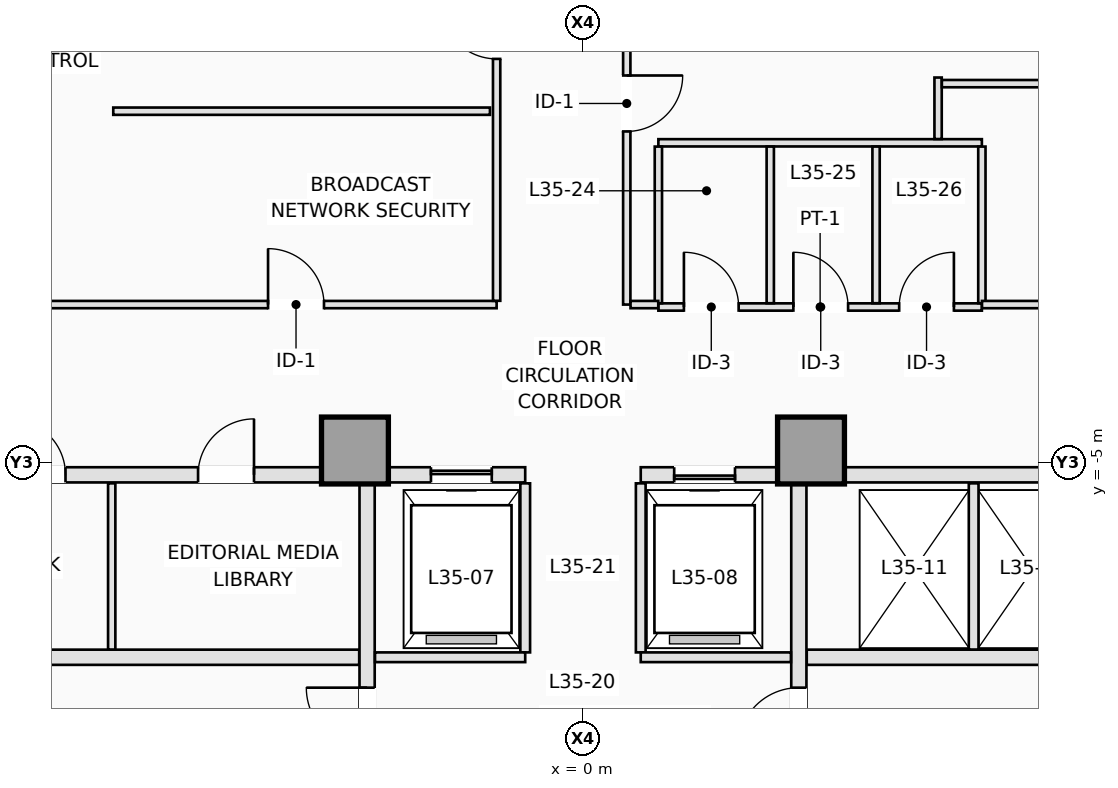
"""IFC4 building model, lengths in metres.
Left out: names, types, materials, properties, quantities, classifications, styles, units other than length and angle.
Written with IfcOpenShell. Run it as: python <this file> out.ifc"""

import sys

from ifc_helpers import new_model, si_unit, direction, frame, frame_2d, origin, origin_2d, place, context, subcontext, project, spatial, rectangle, extrude, element, fill, save


model = new_model("IFC4")
c1 = context("Model", 3, precision=1e-05, world=origin(), true_north=direction((0.0, 1.0)))
c2 = subcontext(c1, "Body", "Model", "MODEL_VIEW")
j1 = project(units=[si_unit("LENGTHUNIT", "METRE"), si_unit("PLANEANGLEUNIT", "RADIAN")], contexts=[c1])
p1 = place(None, origin())
s1 = spatial("IfcSite", under=j1, at=p1, CompositionType="ELEMENT")
p2 = place(p1, origin())
s2 = spatial("IfcBuilding", under=s1, at=p2, CompositionType="ELEMENT")
p3 = place(p2, frame((0.0, 0.0, 130.0)))
s3 = spatial("IfcBuildingStorey", under=s2, at=p3, CompositionType="ELEMENT", Elevation=130.0)
for number, where, z_axis, x_axis in (
    (1, (-3.75, -4.8, 0.0), (0.0, 0.0, 1.0), (1.0, 0.0, 0.0)),
    (2, (3.75, -4.8, 0.0), (0.0, 0.0, 1.0), (1.0, 0.0, 0.0)),
):
    element("IfcColumn", number, at=place(p3, frame(where, z_axis=z_axis, x_axis=x_axis)), inside=s3, PredefinedType="COLUMN", context=c2, shape_type="SweptSolid", body=[
        extrude(rectangle(XDim=1.1, YDim=1.1, at=origin_2d()), origin(), (0.0, 0.0, 1.0), 3.5),
    ])
for number, where, z_axis, x_axis in (
    (3, (-8.92, -8.2, 0.0), (0.0, 0.0, 1.0), (1.0, 0.0, 0.0)),
    (4, (3.68, -8.2, 0.0), (0.0, 0.0, 1.0), (1.0, 0.0, 0.0)),
):
    element("IfcWall", number, at=place(p3, frame(where, z_axis=z_axis, x_axis=x_axis)), inside=s3, PredefinedType="PARTITIONING", context=c2, shape_type="SweptSolid", body=[
        extrude(rectangle(XDim=5.24, YDim=0.25, at=frame_2d((2.62, 0.0))), origin(), (0.0, 0.0, 1.0), 3.25),
    ])
p4 = place(p3, frame((-3.55, -15.798, 0.0), z_axis=(0.0, 0.0, 1.0), x_axis=(0.0, 1.0, 0.0)))
e5 = element("IfcWall", 5, at=p4, inside=s3, PredefinedType="PARTITIONING", context=c2, shape_type="SweptSolid", body=[
    extrude(rectangle(XDim=10.446, YDim=0.25, at=frame_2d((5.223, 0.0))), origin(), (0.0, 0.0, 1.0), 3.25),
])
p5 = place(p4, frame((6.098, 0.0, 0.0)))
e6 = element("IfcOpeningElement", 6, at=p5, cuts=e5, PredefinedType="OPENING", context=c2, shape_type="SweptSolid", body=[
    extrude(rectangle(XDim=1.0, YDim=2.15, at=frame_2d((0.5, 1.075))), frame((0.0, 0.135, 0.0), z_axis=(0.0, -1.0, 0.0), x_axis=(1.0, 0.0, 0.0)), (0.0, 0.0, 1.0), 0.27),
])
p6 = place(p3, frame((3.55, -15.798, 0.0), z_axis=(0.0, 0.0, 1.0), x_axis=(0.0, 1.0, 0.0)))
e7 = element("IfcWall", 7, at=p6, inside=s3, PredefinedType="PARTITIONING", context=c2, shape_type="SweptSolid", body=[
    extrude(rectangle(XDim=10.446, YDim=0.25, at=frame_2d((5.223, 0.0))), origin(), (0.0, 0.0, 1.0), 3.25),
])
p7 = place(p6, frame((6.098, 0.0, 0.0)))
e8 = element("IfcOpeningElement", 8, at=p7, cuts=e7, PredefinedType="OPENING", context=c2, shape_type="SweptSolid", body=[
    extrude(rectangle(XDim=1.0, YDim=2.15, at=frame_2d((0.5, 1.075))), frame((0.0, 0.135, 0.0), z_axis=(0.0, -1.0, 0.0), x_axis=(1.0, 0.0, 0.0)), (0.0, 0.0, 1.0), 0.27),
])
p8 = place(p3, frame((-12.398, -5.2, 0.0), z_axis=(0.0, 0.0, 1.0), x_axis=(1.0, 0.0, 0.0)))
e9 = element("IfcWall", 9, at=p8, inside=s3, PredefinedType="PARTITIONING", context=c2, shape_type="SweptSolid", body=[
    extrude(rectangle(XDim=8.096, YDim=0.25, at=frame_2d((4.048, 0.0))), origin(), (0.0, 0.0, 1.0), 3.25),
])
p9 = place(p8, frame((2.968, 0.0, 0.0)))
e10 = element("IfcOpeningElement", 10, at=p9, cuts=e9, PredefinedType="OPENING", context=c2, shape_type="SweptSolid", body=[
    extrude(rectangle(XDim=0.92, YDim=2.12, at=frame_2d((0.46, 1.06))), frame((0.0, 0.135, 0.0), z_axis=(0.0, -1.0, 0.0), x_axis=(1.0, 0.0, 0.0)), (0.0, 0.0, 1.0), 0.27),
])
p10 = place(p8, frame((6.068, 0.0, 0.0)))
e11 = element("IfcOpeningElement", 11, at=p10, cuts=e9, PredefinedType="OPENING", context=c2, shape_type="SweptSolid", body=[
    extrude(rectangle(XDim=0.92, YDim=2.12, at=frame_2d((0.46, 1.06))), frame((0.0, 0.135, 0.0), z_axis=(0.0, -1.0, 0.0), x_axis=(1.0, 0.0, 0.0)), (0.0, 0.0, 1.0), 0.27),
])
p11 = place(p3, frame((4.302, -5.2, 0.0), z_axis=(0.0, 0.0, 1.0), x_axis=(1.0, 0.0, 0.0)))
e12 = element("IfcWall", 12, at=p11, inside=s3, PredefinedType="PARTITIONING", context=c2, shape_type="SweptSolid", body=[
    extrude(rectangle(XDim=8.096, YDim=0.25, at=frame_2d((4.048, 0.0))), origin(), (0.0, 0.0, 1.0), 3.25),
])
p12 = place(p3, frame((-3.198, -5.2, 0.0), z_axis=(0.0, 0.0, 1.0), x_axis=(1.0, 0.0, 0.0)))
e13 = element("IfcWall", 13, at=p12, inside=s3, PredefinedType="PARTITIONING", context=c2, shape_type="SweptSolid", body=[
    extrude(rectangle(XDim=2.248, YDim=0.25, at=frame_2d((1.124, 0.0))), origin(), (0.0, 0.0, 1.0), 3.25),
])
p13 = place(p12, frame((0.698, 0.0, 0.0)))
e14 = element("IfcOpeningElement", 14, at=p13, cuts=e13, PredefinedType="OPENING", context=c2, shape_type="SweptSolid", body=[
    extrude(rectangle(XDim=1.0, YDim=2.15, at=frame_2d((0.5, 1.075))), frame((0.0, 0.135, 0.0), z_axis=(0.0, -1.0, 0.0), x_axis=(1.0, 0.0, 0.0)), (0.0, 0.0, 1.0), 0.27),
])
p14 = place(p3, frame((0.95, -5.2, 0.0), z_axis=(0.0, 0.0, 1.0), x_axis=(1.0, 0.0, 0.0)))
e15 = element("IfcWall", 15, at=p14, inside=s3, PredefinedType="PARTITIONING", context=c2, shape_type="SweptSolid", body=[
    extrude(rectangle(XDim=2.248, YDim=0.25, at=frame_2d((1.124, 0.0))), origin(), (0.0, 0.0, 1.0), 3.25),
])
p15 = place(p14, frame((0.55, 0.0, 0.0)))
e16 = element("IfcOpeningElement", 16, at=p15, cuts=e15, PredefinedType="OPENING", context=c2, shape_type="SweptSolid", body=[
    extrude(rectangle(XDim=1.0, YDim=2.15, at=frame_2d((0.5, 1.075))), frame((0.0, 0.135, 0.0), z_axis=(0.0, -1.0, 0.0), x_axis=(1.0, 0.0, 0.0)), (0.0, 0.0, 1.0), 0.27),
])
p16 = place(p3, frame((-7.75, -8.073, 0.0), z_axis=(0.0, 0.0, 1.0), x_axis=(0.0, 1.0, 0.0)))
e17 = element("IfcWall", 17, at=p16, inside=s3, PredefinedType="PARTITIONING", context=c2, shape_type="SweptSolid", body=[
    extrude(rectangle(XDim=2.733, YDim=0.12, at=frame_2d((1.366, 0.0))), origin(), (0.0, 0.0, 1.0), 3.25),
])
p17 = place(p3, frame((6.425, -8.073, 0.0), z_axis=(0.0, 0.0, 1.0), x_axis=(0.0, 1.0, 0.0)))
e18 = element("IfcWall", 18, at=p17, inside=s3, PredefinedType="PARTITIONING", context=c2, shape_type="SweptSolid", body=[
    extrude(rectangle(XDim=2.733, YDim=0.16, at=frame_2d((1.366, 0.0))), origin(), (0.0, 0.0, 1.0), 3.25),
])
for number, where, z_axis, x_axis in (
    (19, (-0.95, -8.12, 0.0), (0.0, 0.0, 1.0), (0.0, 1.0, 0.0)),
    (20, (0.95, -8.12, 0.0), (0.0, 0.0, 1.0), (0.0, 1.0, 0.0)),
):
    element("IfcWall", number, at=place(p3, frame(where, z_axis=z_axis, x_axis=x_axis)), inside=s3, PredefinedType="PARTITIONING", context=c2, shape_type="SweptSolid", body=[
        extrude(rectangle(XDim=2.78, YDim=0.16, at=frame_2d((1.39, 0.0))), origin(), (0.0, 0.0, 1.0), 3.25),
    ])
for number, where, z_axis, x_axis in (
    (21, (-3.42, -8.2, 0.0), (0.0, 0.0, 1.0), (1.0, 0.0, 0.0)),
    (22, (0.95, -8.2, 0.0), (0.0, 0.0, 1.0), (1.0, 0.0, 0.0)),
):
    element("IfcWall", number, at=place(p3, frame(where, z_axis=z_axis, x_axis=x_axis)), inside=s3, PredefinedType="PARTITIONING", context=c2, shape_type="SweptSolid", body=[
        extrude(rectangle(XDim=2.47, YDim=0.16, at=frame_2d((1.235, 0.0))), origin(), (0.0, 0.0, 1.0), 3.25),
    ])
p18 = place(p3, frame((1.24, -2.44, 0.0), z_axis=(0.0, 0.0, 1.0), x_axis=(1.0, 0.0, 0.0)))
e23 = element("IfcWall", 23, at=p18, inside=s3, PredefinedType="PARTITIONING", context=c2, shape_type="SweptSolid", body=[
    extrude(rectangle(XDim=5.32, YDim=0.12, at=frame_2d((2.66, 0.0))), origin(), (0.0, 0.0, 1.0), 2.891),
])
p19 = place(p18, frame((0.42, 0.0, 0.0)))
e24 = element("IfcOpeningElement", 24, at=p19, cuts=e23, PredefinedType="OPENING", context=c2, shape_type="SweptSolid", body=[
    extrude(rectangle(XDim=0.9, YDim=2.12, at=frame_2d((0.45, 1.06))), frame((0.0, 0.07, 0.0), z_axis=(0.0, -1.0, 0.0), x_axis=(1.0, 0.0, 0.0)), (0.0, 0.0, 1.0), 0.14),
])
p20 = place(p18, frame((2.22, 0.0, 0.0)))
e25 = element("IfcOpeningElement", 25, at=p20, cuts=e23, PredefinedType="OPENING", context=c2, shape_type="SweptSolid", body=[
    extrude(rectangle(XDim=0.9, YDim=2.12, at=frame_2d((0.45, 1.06))), frame((0.0, 0.07, 0.0), z_axis=(0.0, -1.0, 0.0), x_axis=(1.0, 0.0, 0.0)), (0.0, 0.0, 1.0), 0.14),
])
p21 = place(p18, frame((3.96, 0.0, 0.0)))
e26 = element("IfcOpeningElement", 26, at=p21, cuts=e23, PredefinedType="OPENING", context=c2, shape_type="SweptSolid", body=[
    extrude(rectangle(XDim=0.9, YDim=2.12, at=frame_2d((0.45, 1.06))), frame((0.0, 0.07, 0.0), z_axis=(0.0, -1.0, 0.0), x_axis=(1.0, 0.0, 0.0)), (0.0, 0.0, 1.0), 0.14),
])
p22 = place(p3, frame((1.24, 0.26, 0.0), z_axis=(0.0, 0.0, 1.0), x_axis=(1.0, 0.0, 0.0)))
e27 = element("IfcWall", 27, at=p22, inside=s3, PredefinedType="PARTITIONING", context=c2, shape_type="SweptSolid", body=[
    extrude(rectangle(XDim=5.32, YDim=0.12, at=frame_2d((2.66, 0.0))), origin(), (0.0, 0.0, 1.0), 3.25),
])
for number, where, z_axis, x_axis in (
    (28, (1.24, -2.378, 0.0), (0.0, 0.0, 1.0), (0.0, 1.0, 0.0)),
    (29, (3.08, -2.378, 0.0), (0.0, 0.0, 1.0), (0.0, 1.0, 0.0)),
    (30, (4.82, -2.378, 0.0), (0.0, 0.0, 1.0), (0.0, 1.0, 0.0)),
    (31, (6.56, -2.378, 0.0), (0.0, 0.0, 1.0), (0.0, 1.0, 0.0)),
):
    element("IfcWall", number, at=place(p3, frame(where, z_axis=z_axis, x_axis=x_axis)), inside=s3, PredefinedType="PARTITIONING", context=c2, shape_type="SweptSolid", body=[
        extrude(rectangle(XDim=2.576, YDim=0.12, at=frame_2d((1.288, 0.0))), origin(), (0.0, 0.0, 1.0), 3.25),
    ])
p23 = place(p3, frame((-12.348, -2.4, 0.0), z_axis=(0.0, 0.0, 1.0), x_axis=(1.0, 0.0, 0.0)))
e32 = element("IfcWall", 32, at=p23, inside=s3, PredefinedType="PARTITIONING", context=c2, shape_type="SweptSolid", body=[
    extrude(rectangle(XDim=10.928, YDim=0.12, at=frame_2d((5.464, 0.0))), origin(), (0.0, 0.0, 1.0), 2.891),
])
p24 = place(p23, frame((7.169, 0.0, 0.0)))
e33 = element("IfcOpeningElement", 33, at=p24, cuts=e32, PredefinedType="OPENING", context=c2, shape_type="SweptSolid", body=[
    extrude(rectangle(XDim=0.92, YDim=2.12, at=frame_2d((0.46, 1.06))), frame((0.0, 0.07, 0.0), z_axis=(0.0, -1.0, 0.0), x_axis=(1.0, 0.0, 0.0)), (0.0, 0.0, 1.0), 0.14),
])
p25 = place(p23, frame((1.168, 0.0, 0.0)))
e34 = element("IfcOpeningElement", 34, at=p25, cuts=e32, PredefinedType="OPENING", context=c2, shape_type="SweptSolid", body=[
    extrude(rectangle(XDim=0.92, YDim=2.12, at=frame_2d((0.46, 1.06))), frame((0.0, 0.07, 0.0), z_axis=(0.0, -1.0, 0.0), x_axis=(1.0, 0.0, 0.0)), (0.0, 0.0, 1.0), 0.14),
])
p26 = place(p3, frame((-1.42, -2.338, 0.0), z_axis=(0.0, 0.0, 1.0), x_axis=(0.0, 1.0, 0.0)))
e35 = element("IfcWall", 35, at=p26, inside=s3, PredefinedType="PARTITIONING", context=c2, shape_type="SweptSolid", body=[
    extrude(rectangle(XDim=12.788, YDim=0.12, at=frame_2d((6.394, 0.0))), origin(), (0.0, 0.0, 1.0), 3.25),
])
p27 = place(p26, frame((10.515, 0.0, 0.0)))
e36 = element("IfcOpeningElement", 36, at=p27, cuts=e35, PredefinedType="OPENING", context=c2, shape_type="SweptSolid", body=[
    extrude(rectangle(XDim=0.92, YDim=2.12, at=frame_2d((0.46, 1.06))), frame((0.0, 0.07, 0.0), z_axis=(0.0, -1.0, 0.0), x_axis=(1.0, 0.0, 0.0)), (0.0, 0.0, 1.0), 0.14),
])
p28 = place(p26, frame((6.578, 0.0, 0.0)))
e37 = element("IfcOpeningElement", 37, at=p28, cuts=e35, PredefinedType="OPENING", context=c2, shape_type="SweptSolid", body=[
    extrude(rectangle(XDim=0.92, YDim=2.12, at=frame_2d((0.46, 1.06))), frame((0.0, 0.07, 0.0), z_axis=(0.0, -1.0, 0.0), x_axis=(1.0, 0.0, 0.0)), (0.0, 0.0, 1.0), 0.14),
])
p29 = place(p26, frame((3.978, 0.0, 0.0)))
e38 = element("IfcOpeningElement", 38, at=p29, cuts=e35, PredefinedType="OPENING", context=c2, shape_type="SweptSolid", body=[
    extrude(rectangle(XDim=0.92, YDim=2.12, at=frame_2d((0.46, 1.06))), frame((0.0, 0.07, 0.0), z_axis=(0.0, -1.0, 0.0), x_axis=(1.0, 0.0, 0.0)), (0.0, 0.0, 1.0), 0.14),
])
p30 = place(p3, frame((0.72, 10.388, 0.0), z_axis=(0.0, 0.0, 1.0), x_axis=(0.0, -1.0, 0.0)))
e39 = element("IfcWall", 39, at=p30, inside=s3, PredefinedType="PARTITIONING", context=c2, shape_type="SweptSolid", body=[
    extrude(rectangle(XDim=12.788, YDim=0.12, at=frame_2d((6.394, 0.0))), origin(), (0.0, 0.0, 1.0), 3.25),
])
p31 = place(p30, frame((4.409, 0.0, 0.0)))
e40 = element("IfcOpeningElement", 40, at=p31, cuts=e39, PredefinedType="OPENING", context=c2, shape_type="SweptSolid", body=[
    extrude(rectangle(XDim=0.92, YDim=2.12, at=frame_2d((0.46, 1.06))), frame((0.0, 0.07, 0.0), z_axis=(0.0, -1.0, 0.0), x_axis=(1.0, 0.0, 0.0)), (0.0, 0.0, 1.0), 0.14),
])
p32 = place(p30, frame((9.021, 0.0, 0.0)))
e41 = element("IfcOpeningElement", 41, at=p32, cuts=e39, PredefinedType="OPENING", context=c2, shape_type="SweptSolid", body=[
    extrude(rectangle(XDim=0.92, YDim=2.12, at=frame_2d((0.46, 1.06))), frame((0.0, 0.07, 0.0), z_axis=(0.0, -1.0, 0.0), x_axis=(1.0, 0.0, 0.0)), (0.0, 0.0, 1.0), 0.14),
])
p33 = place(p3, frame((0.782, -2.4, 0.0), z_axis=(0.0, 0.0, 1.0), x_axis=(1.0, 0.0, 0.0)))
e42 = element("IfcWall", 42, at=p33, inside=s3, PredefinedType="PARTITIONING", context=c2, shape_type="SweptSolid", body=[
    extrude(rectangle(XDim=0.456, YDim=0.12, at=frame_2d((0.228, 0.0))), origin(), (0.0, 0.0, 1.0), 2.891),
])
p34 = place(p3, frame((6.562, -2.4, 0.0), z_axis=(0.0, 0.0, 1.0), x_axis=(1.0, 0.0, 0.0)))
e43 = element("IfcWall", 43, at=p34, inside=s3, PredefinedType="PARTITIONING", context=c2, shape_type="SweptSolid", body=[
    extrude(rectangle(XDim=5.848, YDim=0.12, at=frame_2d((2.924, 0.0))), origin(), (0.0, 0.0, 1.0), 3.25),
])
p35 = place(p34, frame((2.344, 0.0, 0.0)))
e44 = element("IfcOpeningElement", 44, at=p35, cuts=e43, PredefinedType="OPENING", context=c2, shape_type="SweptSolid", body=[
    extrude(rectangle(XDim=0.92, YDim=2.12, at=frame_2d((0.46, 1.06))), frame((0.0, 0.07, 0.0), z_axis=(0.0, -1.0, 0.0), x_axis=(1.0, 0.0, 0.0)), (0.0, 0.0, 1.0), 0.14),
])
p36 = place(p3, frame((5.84, 1.333, 0.0), z_axis=(0.0, 0.0, 1.0), x_axis=(0.0, -1.0, 0.0)))
e45 = element("IfcWall", 45, at=p36, inside=s3, PredefinedType="PARTITIONING", context=c2, shape_type="SweptSolid", body=[
    extrude(rectangle(XDim=1.011, YDim=0.12, at=frame_2d((0.506, 0.0))), origin(), (0.0, 0.0, 1.0), 3.25),
])
p37 = place(p3, frame((14.357, 1.23, 0.0), z_axis=(0.0, 0.0, 1.0), x_axis=(-0.999999918286, 0.000404262044, 0.0)))
e46 = element("IfcWall", 46, at=p37, inside=s3, PredefinedType="PARTITIONING", context=c2, shape_type="SweptSolid", body=[
    extrude(rectangle(XDim=8.455, YDim=0.12, at=frame_2d((4.228, 0.0))), origin(), (0.0, 0.0, 1.0), 3.25),
])
p38 = place(p3, frame((-1.53, 0.78, 0.0), z_axis=(0.0, 0.0, 1.0), x_axis=(-1.0, 0.0, 0.0)))
e47 = element("IfcWall", 47, at=p38, inside=s3, PredefinedType="PARTITIONING", context=c2, shape_type="SweptSolid", body=[
    extrude(rectangle(XDim=6.195, YDim=0.12, at=frame_2d((3.097, 0.0))), origin(), (0.0, 0.0, 1.0), 3.25),
])
p39 = place(p13, origin())
e48 = element("IfcDoor", 48, at=p39, inside=s3, OperationType="SLIDING_TO_LEFT", PredefinedType="DOOR", context=c2, shape_type="SweptSolid", body=[
    extrude(rectangle(XDim=1.0, YDim=2.15, at=frame_2d((0.5, 1.075))), frame((0.0, 0.025, 0.0), z_axis=(0.0, -1.0, 0.0), x_axis=(1.0, 0.0, 0.0)), (0.0, 0.0, 1.0), 0.05),
])
fill(e14, e48)
p40 = place(p15, origin())
e49 = element("IfcDoor", 49, at=p40, inside=s3, OperationType="SLIDING_TO_RIGHT", PredefinedType="DOOR", context=c2, shape_type="SweptSolid", body=[
    extrude(rectangle(XDim=1.0, YDim=2.15, at=frame_2d((0.5, 1.075))), frame((0.0, 0.025, 0.0), z_axis=(0.0, -1.0, 0.0), x_axis=(1.0, 0.0, 0.0)), (0.0, 0.0, 1.0), 0.05),
])
fill(e16, e49)
p41 = place(p5, origin())
e50 = element("IfcDoor", 50, at=p41, inside=s3, OperationType="SINGLE_SWING_RIGHT", PredefinedType="DOOR", context=c2, shape_type="SweptSolid", body=[
    extrude(rectangle(XDim=1.0, YDim=2.15, at=frame_2d((0.5, 1.075))), frame((0.0, 0.025, 0.0), z_axis=(0.0, -1.0, 0.0), x_axis=(1.0, 0.0, 0.0)), (0.0, 0.0, 1.0), 0.05),
])
fill(e6, e50)
p42 = place(p7, origin())
e51 = element("IfcDoor", 51, at=p42, inside=s3, OperationType="SINGLE_SWING_LEFT", PredefinedType="DOOR", context=c2, shape_type="SweptSolid", body=[
    extrude(rectangle(XDim=1.0, YDim=2.15, at=frame_2d((0.5, 1.075))), frame((0.0, 0.025, 0.0), z_axis=(0.0, -1.0, 0.0), x_axis=(1.0, 0.0, 0.0)), (0.0, 0.0, 1.0), 0.05),
])
fill(e8, e51)
p43 = place(p9, origin())
e52 = element("IfcDoor", 52, at=p43, inside=s3, OperationType="SINGLE_SWING_LEFT", PredefinedType="DOOR", context=c2, shape_type="SweptSolid", body=[
    extrude(rectangle(XDim=0.92, YDim=2.12, at=frame_2d((0.46, 1.06))), frame((0.0, 0.025, 0.0), z_axis=(0.0, -1.0, 0.0), x_axis=(1.0, 0.0, 0.0)), (0.0, 0.0, 1.0), 0.05),
])
fill(e10, e52)
p44 = place(p10, origin())
e53 = element("IfcDoor", 53, at=p44, inside=s3, OperationType="SINGLE_SWING_RIGHT", PredefinedType="DOOR", context=c2, shape_type="SweptSolid", body=[
    extrude(rectangle(XDim=0.92, YDim=2.12, at=frame_2d((0.46, 1.06))), frame((0.0, 0.025, 0.0), z_axis=(0.0, -1.0, 0.0), x_axis=(1.0, 0.0, 0.0)), (0.0, 0.0, 1.0), 0.05),
])
fill(e11, e53)
p45 = place(p19, origin())
e54 = element("IfcDoor", 54, at=p45, inside=s3, OperationType="SINGLE_SWING_LEFT", PredefinedType="DOOR", context=c2, shape_type="SweptSolid", body=[
    extrude(rectangle(XDim=0.9, YDim=2.12, at=frame_2d((0.45, 1.06))), frame((0.0, 0.025, 0.0), z_axis=(0.0, -1.0, 0.0), x_axis=(1.0, 0.0, 0.0)), (0.0, 0.0, 1.0), 0.05),
])
fill(e24, e54)
p46 = place(p20, origin())
e55 = element("IfcDoor", 55, at=p46, inside=s3, OperationType="SINGLE_SWING_LEFT", PredefinedType="DOOR", context=c2, shape_type="SweptSolid", body=[
    extrude(rectangle(XDim=0.9, YDim=2.12, at=frame_2d((0.45, 1.06))), frame((0.0, 0.025, 0.0), z_axis=(0.0, -1.0, 0.0), x_axis=(1.0, 0.0, 0.0)), (0.0, 0.0, 1.0), 0.05),
])
fill(e25, e55)
p47 = place(p21, origin())
e56 = element("IfcDoor", 56, at=p47, inside=s3, OperationType="SINGLE_SWING_RIGHT", PredefinedType="DOOR", context=c2, shape_type="SweptSolid", body=[
    extrude(rectangle(XDim=0.9, YDim=2.12, at=frame_2d((0.45, 1.06))), frame((0.0, 0.025, 0.0), z_axis=(0.0, -1.0, 0.0), x_axis=(1.0, 0.0, 0.0)), (0.0, 0.0, 1.0), 0.05),
])
fill(e26, e56)
p48 = place(p32, origin())
e57 = element("IfcDoor", 57, at=p48, inside=s3, OperationType="SINGLE_SWING_LEFT", PredefinedType="DOOR", context=c2, shape_type="SweptSolid", body=[
    extrude(rectangle(XDim=0.92, YDim=2.12, at=frame_2d((0.46, 1.06))), frame((0.0, 0.025, 0.0), z_axis=(0.0, -1.0, 0.0), x_axis=(1.0, 0.0, 0.0)), (0.0, 0.0, 1.0), 0.05),
])
fill(e41, e57)
p49 = place(p29, origin())
e58 = element("IfcDoor", 58, at=p49, inside=s3, OperationType="SINGLE_SWING_RIGHT", PredefinedType="DOOR", context=c2, shape_type="SweptSolid", body=[
    extrude(rectangle(XDim=0.92, YDim=2.12, at=frame_2d((0.46, 1.06))), frame((0.0, 0.025, 0.0), z_axis=(0.0, -1.0, 0.0), x_axis=(1.0, 0.0, 0.0)), (0.0, 0.0, 1.0), 0.05),
])
fill(e38, e58)
p50 = place(p24, origin())
e59 = element("IfcDoor", 59, at=p50, inside=s3, OperationType="SINGLE_SWING_LEFT", PredefinedType="DOOR", context=c2, shape_type="SweptSolid", body=[
    extrude(rectangle(XDim=0.92, YDim=2.12, at=frame_2d((0.46, 1.06))), frame((0.0, 0.025, 0.0), z_axis=(0.0, -1.0, 0.0), x_axis=(1.0, 0.0, 0.0)), (0.0, 0.0, 1.0), 0.05),
])
fill(e33, e59)
save(model, sys.argv[1])
